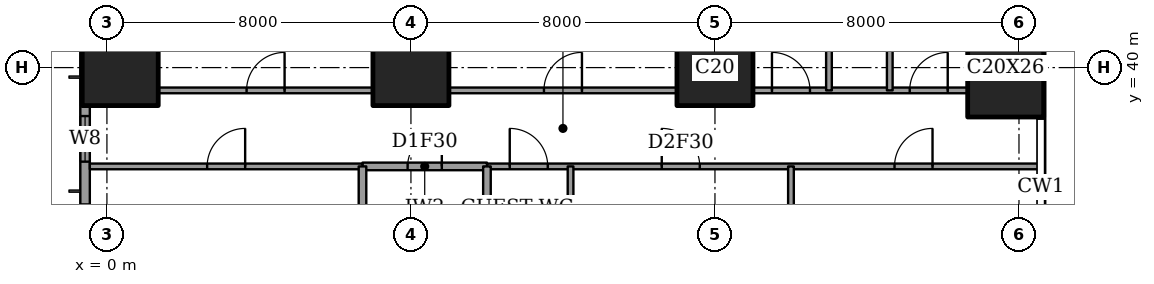
"""IFC4 building model, lengths in metres.
Left out: names, types, materials, properties, quantities, classifications, styles, units other than length and angle.
Written with IfcOpenShell. Run it as: python <this file> out.ifc"""

import sys

from ifc_helpers import new_model, si_unit, direction, frame, frame_2d, origin, origin_2d, place, context, subcontext, project, spatial, rectangle, extrude, element, fill, save


model = new_model("IFC4")
c1 = context("Model", 3, precision=1e-05, world=origin(), true_north=direction((0.0, 1.0)))
c2 = subcontext(c1, "Body", "Model", "MODEL_VIEW")
j1 = project(units=[si_unit("LENGTHUNIT", "METRE"), si_unit("PLANEANGLEUNIT", "RADIAN")], contexts=[c1])
p1 = place(None, origin())
s1 = spatial("IfcSite", under=j1, at=p1, CompositionType="ELEMENT")
p2 = place(p1, origin())
s2 = spatial("IfcBuilding", under=s1, at=p2, CompositionType="ELEMENT")
p3 = place(p2, frame((0.0, 0.0, 87.2)))
s3 = spatial("IfcBuildingStorey", under=s2, at=p3, CompositionType="ELEMENT", Elevation=87.2)
for number, where, z_axis, x_axis in (
    (1, (0.35, 40.0, 0.0), (0.0, 0.0, 1.0), (1.0, 0.0, 0.0)),
    (2, (8.0, 40.0, 0.0), (0.0, 0.0, 1.0), (1.0, 0.0, 0.0)),
    (3, (16.0, 40.0, 0.0), (0.0, 0.0, 1.0), (1.0, 0.0, 0.0)),
):
    element("IfcColumn", number, at=place(p3, frame(where, z_axis=z_axis, x_axis=x_axis)), inside=s3, PredefinedType="COLUMN", context=c2, shape_type="SweptSolid", body=[
        extrude(rectangle(XDim=2.0, YDim=2.0, at=origin_2d()), origin(), (0.0, 0.0, 1.0), 3.6),
    ])
p4 = place(p3, frame((23.65, 40.0, 0.0), z_axis=(0.0, 0.0, 1.0), x_axis=(1.0, 0.0, 0.0)))
e4 = element("IfcColumn", 4, at=p4, inside=s3, PredefinedType="COLUMN", context=c2, shape_type="SweptSolid", body=[
    extrude(rectangle(XDim=2.0, YDim=2.6, at=origin_2d()), origin(), (0.0, 0.0, 1.0), 3.6),
])
p5 = place(p3, frame((-0.575, 44.825, 0.0), z_axis=(0.0, 0.0, 1.0), x_axis=(0.0, -1.0, 0.0)))
e5 = element("IfcWall", 5, at=p5, inside=s3, PredefinedType="SOLIDWALL", context=c2, shape_type="SweptSolid", body=[
    extrude(rectangle(XDim=41.65, YDim=0.25, at=frame_2d((20.825, 0.0))), origin(), (0.0, 0.0, 1.0), 3.6),
])
p6 = place(p5, frame((0.775, 0.0, 0.6)))
e6 = element("IfcOpeningElement", 6, at=p6, cuts=e5, PredefinedType="OPENING", context=c2, shape_type="SweptSolid", body=[
    extrude(rectangle(XDim=2.4, YDim=2.0, at=frame_2d((1.2, 1.0))), frame((0.0, 0.135, 0.0), z_axis=(0.0, -1.0, 0.0), x_axis=(1.0, 0.0, 0.0)), (0.0, 0.0, 1.0), 0.27),
])
p7 = place(p5, frame((6.1, 0.0, 0.6)))
e7 = element("IfcOpeningElement", 7, at=p7, cuts=e5, PredefinedType="OPENING", context=c2, shape_type="SweptSolid", body=[
    extrude(rectangle(XDim=1.2, YDim=2.0, at=frame_2d((0.6, 1.0))), frame((0.0, 0.135, 0.0), z_axis=(0.0, -1.0, 0.0), x_axis=(1.0, 0.0, 0.0)), (0.0, 0.0, 1.0), 0.27),
])
p8 = place(p5, frame((8.425, 0.0, 0.6)))
e8 = element("IfcOpeningElement", 8, at=p8, cuts=e5, PredefinedType="OPENING", context=c2, shape_type="SweptSolid", body=[
    extrude(rectangle(XDim=2.4, YDim=2.0, at=frame_2d((1.2, 1.0))), frame((0.0, 0.135, 0.0), z_axis=(0.0, -1.0, 0.0), x_axis=(1.0, 0.0, 0.0)), (0.0, 0.0, 1.0), 0.27),
])
p9 = place(p5, frame((15.625, 0.0, 0.6)))
e9 = element("IfcOpeningElement", 9, at=p9, cuts=e5, PredefinedType="OPENING", context=c2, shape_type="SweptSolid", body=[
    extrude(rectangle(XDim=2.4, YDim=2.0, at=frame_2d((1.2, 1.0))), frame((0.0, 0.135, 0.0), z_axis=(0.0, -1.0, 0.0), x_axis=(1.0, 0.0, 0.0)), (0.0, 0.0, 1.0), 0.27),
])
p10 = place(p5, frame((23.625, 0.0, 0.6)))
e10 = element("IfcOpeningElement", 10, at=p10, cuts=e5, PredefinedType="OPENING", context=c2, shape_type="SweptSolid", body=[
    extrude(rectangle(XDim=2.4, YDim=2.0, at=frame_2d((1.2, 1.0))), frame((0.0, 0.135, 0.0), z_axis=(0.0, -1.0, 0.0), x_axis=(1.0, 0.0, 0.0)), (0.0, 0.0, 1.0), 0.27),
])
p11 = place(p5, frame((30.825, 0.0, 0.6)))
e11 = element("IfcOpeningElement", 11, at=p11, cuts=e5, PredefinedType="OPENING", context=c2, shape_type="SweptSolid", body=[
    extrude(rectangle(XDim=2.4, YDim=2.0, at=frame_2d((1.2, 1.0))), frame((0.0, 0.135, 0.0), z_axis=(0.0, -1.0, 0.0), x_axis=(1.0, 0.0, 0.0)), (0.0, 0.0, 1.0), 0.27),
])
p12 = place(p5, frame((34.5, 0.0, 0.6)))
e12 = element("IfcOpeningElement", 12, at=p12, cuts=e5, PredefinedType="OPENING", context=c2, shape_type="SweptSolid", body=[
    extrude(rectangle(XDim=1.2, YDim=2.0, at=frame_2d((0.6, 1.0))), frame((0.0, 0.135, 0.0), z_axis=(0.0, -1.0, 0.0), x_axis=(1.0, 0.0, 0.0)), (0.0, 0.0, 1.0), 0.27),
])
p13 = place(p5, frame((38.475, 0.0, 0.6)))
e13 = element("IfcOpeningElement", 13, at=p13, cuts=e5, PredefinedType="OPENING", context=c2, shape_type="SweptSolid", body=[
    extrude(rectangle(XDim=2.4, YDim=2.0, at=frame_2d((1.2, 1.0))), frame((0.0, 0.135, 0.0), z_axis=(0.0, -1.0, 0.0), x_axis=(1.0, 0.0, 0.0)), (0.0, 0.0, 1.0), 0.27),
])
p14 = place(p3, frame((6.725, 37.4, 0.0), z_axis=(0.0, 0.0, 1.0), x_axis=(1.0, 0.0, 0.0)))
e14 = element("IfcWall", 14, at=p14, inside=s3, PredefinedType="PARTITIONING", context=c2, shape_type="SweptSolid", body=[
    extrude(rectangle(XDim=3.275, YDim=0.2, at=frame_2d((1.637, 0.0))), origin(), (0.0, 0.0, 1.0), 3.25),
])
p15 = place(p14, frame((1.188, 0.0, 0.0)))
e15 = element("IfcOpeningElement", 15, at=p15, cuts=e14, PredefinedType="OPENING", context=c2, shape_type="SweptSolid", body=[
    extrude(rectangle(XDim=0.9, YDim=2.1, at=frame_2d((0.45, 1.05))), frame((0.0, 0.11, 0.0), z_axis=(0.0, -1.0, 0.0), x_axis=(1.0, 0.0, 0.0)), (0.0, 0.0, 1.0), 0.22),
])
p16 = place(p3, frame((-0.45, 37.4, 0.0), z_axis=(0.0, 0.0, 1.0), x_axis=(1.0, 0.0, 0.0)))
e16 = element("IfcWall", 16, at=p16, inside=s3, PredefinedType="PARTITIONING", context=c2, shape_type="SweptSolid", body=[
    extrude(rectangle(XDim=7.175, YDim=0.15, at=frame_2d((3.587, 0.0))), origin(), (0.0, 0.0, 1.0), 3.25),
])
p17 = place(p16, frame((3.087, 0.0, 0.0)))
e17 = element("IfcOpeningElement", 17, at=p17, cuts=e16, PredefinedType="OPENING", context=c2, shape_type="SweptSolid", body=[
    extrude(rectangle(XDim=1.0, YDim=2.1, at=frame_2d((0.5, 1.05))), frame((0.0, 0.085, 0.0), z_axis=(0.0, -1.0, 0.0), x_axis=(1.0, 0.0, 0.0)), (0.0, 0.0, 1.0), 0.17),
])
p18 = place(p3, frame((10.0, 37.4, 0.0), z_axis=(0.0, 0.0, 1.0), x_axis=(1.0, 0.0, 0.0)))
e18 = element("IfcWall", 18, at=p18, inside=s3, PredefinedType="PARTITIONING", context=c2, shape_type="SweptSolid", body=[
    extrude(rectangle(XDim=14.561, YDim=0.15, at=frame_2d((7.281, 0.0))), origin(), (0.0, 0.0, 1.0), 3.25),
])
p19 = place(p18, frame((0.6, 0.0, 0.0)))
e19 = element("IfcOpeningElement", 19, at=p19, cuts=e18, PredefinedType="OPENING", context=c2, shape_type="SweptSolid", body=[
    extrude(rectangle(XDim=1.0, YDim=2.1, at=frame_2d((0.5, 1.05))), frame((0.0, 0.085, 0.0), z_axis=(0.0, -1.0, 0.0), x_axis=(1.0, 0.0, 0.0)), (0.0, 0.0, 1.0), 0.17),
])
p20 = place(p18, frame((4.6, 0.0, 0.0)))
e20 = element("IfcOpeningElement", 20, at=p20, cuts=e18, PredefinedType="OPENING", context=c2, shape_type="SweptSolid", body=[
    extrude(rectangle(XDim=1.0, YDim=2.1, at=frame_2d((0.5, 1.05))), frame((0.0, 0.085, 0.0), z_axis=(0.0, -1.0, 0.0), x_axis=(1.0, 0.0, 0.0)), (0.0, 0.0, 1.0), 0.17),
])
p21 = place(p18, frame((10.725, 0.0, 0.0)))
e21 = element("IfcOpeningElement", 21, at=p21, cuts=e18, PredefinedType="OPENING", context=c2, shape_type="SweptSolid", body=[
    extrude(rectangle(XDim=1.0, YDim=2.1, at=frame_2d((0.5, 1.05))), frame((0.0, 0.085, 0.0), z_axis=(0.0, -1.0, 0.0), x_axis=(1.0, 0.0, 0.0)), (0.0, 0.0, 1.0), 0.17),
])
p22 = place(p3, frame((1.35, 39.4, 0.0), z_axis=(0.0, 0.0, 1.0), x_axis=(1.0, 0.0, 0.0)))
e22 = element("IfcWall", 22, at=p22, inside=s3, PredefinedType="PARTITIONING", context=c2, shape_type="SweptSolid", body=[
    extrude(rectangle(XDim=5.65, YDim=0.15, at=frame_2d((2.825, 0.0))), origin(), (0.0, 0.0, 1.0), 3.25),
])
p23 = place(p22, frame((2.325, 0.0, 0.0)))
e23 = element("IfcOpeningElement", 23, at=p23, cuts=e22, PredefinedType="OPENING", context=c2, shape_type="SweptSolid", body=[
    extrude(rectangle(XDim=1.0, YDim=2.1, at=frame_2d((0.5, 1.05))), frame((0.0, 0.085, 0.0), z_axis=(0.0, -1.0, 0.0), x_axis=(1.0, 0.0, 0.0)), (0.0, 0.0, 1.0), 0.17),
])
p24 = place(p3, frame((9.0, 39.4, 0.0), z_axis=(0.0, 0.0, 1.0), x_axis=(1.0, 0.0, 0.0)))
e24 = element("IfcWall", 24, at=p24, inside=s3, PredefinedType="PARTITIONING", context=c2, shape_type="SweptSolid", body=[
    extrude(rectangle(XDim=6.0, YDim=0.15, at=frame_2d((3.0, 0.0))), origin(), (0.0, 0.0, 1.0), 3.25),
])
p25 = place(p24, frame((2.5, 0.0, 0.0)))
e25 = element("IfcOpeningElement", 25, at=p25, cuts=e24, PredefinedType="OPENING", context=c2, shape_type="SweptSolid", body=[
    extrude(rectangle(XDim=1.0, YDim=2.1, at=frame_2d((0.5, 1.05))), frame((0.0, 0.085, 0.0), z_axis=(0.0, -1.0, 0.0), x_axis=(1.0, 0.0, 0.0)), (0.0, 0.0, 1.0), 0.17),
])
p26 = place(p3, frame((17.0, 39.4, 0.0), z_axis=(0.0, 0.0, 1.0), x_axis=(1.0, 0.0, 0.0)))
e26 = element("IfcWall", 26, at=p26, inside=s3, PredefinedType="PARTITIONING", context=c2, shape_type="SweptSolid", body=[
    extrude(rectangle(XDim=5.65, YDim=0.15, at=frame_2d((2.825, 0.0))), origin(), (0.0, 0.0, 1.0), 3.25),
])
p27 = place(p26, frame((0.5, 0.0, 0.0)))
e27 = element("IfcOpeningElement", 27, at=p27, cuts=e26, PredefinedType="OPENING", context=c2, shape_type="SweptSolid", body=[
    extrude(rectangle(XDim=1.0, YDim=2.1, at=frame_2d((0.5, 1.05))), frame((0.0, 0.085, 0.0), z_axis=(0.0, -1.0, 0.0), x_axis=(1.0, 0.0, 0.0)), (0.0, 0.0, 1.0), 0.17),
])
p28 = place(p26, frame((4.125, 0.0, 0.0)))
e28 = element("IfcOpeningElement", 28, at=p28, cuts=e26, PredefinedType="OPENING", context=c2, shape_type="SweptSolid", body=[
    extrude(rectangle(XDim=1.0, YDim=2.1, at=frame_2d((0.5, 1.05))), frame((0.0, 0.085, 0.0), z_axis=(0.0, -1.0, 0.0), x_axis=(1.0, 0.0, 0.0)), (0.0, 0.0, 1.0), 0.17),
])
p29 = place(p3, frame((6.725, 33.2, 0.0), z_axis=(0.0, 0.0, 1.0), x_axis=(0.0, 1.0, 0.0)))
e29 = element("IfcWall", 29, at=p29, inside=s3, PredefinedType="PARTITIONING", context=c2, shape_type="SweptSolid", body=[
    extrude(rectangle(XDim=4.2, YDim=0.2, at=frame_2d((2.1, 0.0))), origin(), (0.0, 0.0, 1.0), 3.25),
])
p30 = place(p3, frame((10.0, 31.0, 0.0), z_axis=(0.0, 0.0, 1.0), x_axis=(0.0, 1.0, 0.0)))
e30 = element("IfcWall", 30, at=p30, inside=s3, PredefinedType="PARTITIONING", context=c2, shape_type="SweptSolid", body=[
    extrude(rectangle(XDim=6.4, YDim=0.2, at=frame_2d((3.2, 0.0))), origin(), (0.0, 0.0, 1.0), 3.25),
])
p31 = place(p3, frame((12.2, 30.675, 0.0), z_axis=(0.0, 0.0, 1.0), x_axis=(0.0, 1.0, 0.0)))
e31 = element("IfcWall", 31, at=p31, inside=s3, PredefinedType="PARTITIONING", context=c2, shape_type="SweptSolid", body=[
    extrude(rectangle(XDim=6.725, YDim=0.15, at=frame_2d((3.362, 0.0))), origin(), (0.0, 0.0, 1.0), 3.25),
])
p32 = place(p3, frame((18.0, 28.0, 0.0), z_axis=(0.0, 0.0, 1.0), x_axis=(0.0, 1.0, 0.0)))
e32 = element("IfcWall", 32, at=p32, inside=s3, PredefinedType="PARTITIONING", context=c2, shape_type="SweptSolid", body=[
    extrude(rectangle(XDim=9.4, YDim=0.15, at=frame_2d((4.7, 0.0))), origin(), (0.0, 0.0, 1.0), 3.25),
])
p33 = place(p32, frame((0.887, 0.0, 0.0)))
e33 = element("IfcOpeningElement", 33, at=p33, cuts=e32, PredefinedType="OPENING", context=c2, shape_type="SweptSolid", body=[
    extrude(rectangle(XDim=0.9, YDim=2.1, at=frame_2d((0.45, 1.05))), frame((0.0, 0.085, 0.0), z_axis=(0.0, -1.0, 0.0), x_axis=(1.0, 0.0, 0.0)), (0.0, 0.0, 1.0), 0.17),
])
p34 = place(p3, frame((19.0, 39.4, 0.0), z_axis=(0.0, 0.0, 1.0), x_axis=(0.0, 1.0, 0.0)))
e34 = element("IfcWall", 34, at=p34, inside=s3, PredefinedType="PARTITIONING", context=c2, shape_type="SweptSolid", body=[
    extrude(rectangle(XDim=9.05, YDim=0.15, at=frame_2d((4.525, 0.0))), origin(), (0.0, 0.0, 1.0), 3.25),
])
p35 = place(p3, frame((20.6, 39.4, 0.0), z_axis=(0.0, 0.0, 1.0), x_axis=(0.0, 1.0, 0.0)))
e35 = element("IfcWall", 35, at=p35, inside=s3, PredefinedType="PARTITIONING", context=c2, shape_type="SweptSolid", body=[
    extrude(rectangle(XDim=9.05, YDim=0.15, at=frame_2d((4.525, 0.0))), origin(), (0.0, 0.0, 1.0), 3.25),
])
p36 = place(p35, frame((4.075, 0.0, 0.0)))
e36 = element("IfcOpeningElement", 36, at=p36, cuts=e35, PredefinedType="OPENING", context=c2, shape_type="SweptSolid", body=[
    extrude(rectangle(XDim=0.9, YDim=2.1, at=frame_2d((0.45, 1.05))), frame((0.0, 0.085, 0.0), z_axis=(0.0, -1.0, 0.0), x_axis=(1.0, 0.0, 0.0)), (0.0, 0.0, 1.0), 0.17),
])
p37 = place(p7, origin())
e37 = element("IfcWindow", 37, at=p37, inside=s3, PartitioningType="SINGLE_PANEL", PredefinedType="WINDOW", context=c2, shape_type="SweptSolid", body=[
    extrude(rectangle(XDim=1.2, YDim=2.0, at=frame_2d((0.6, 1.0))), frame((0.0, 0.03, 0.0), z_axis=(0.0, -1.0, 0.0), x_axis=(1.0, 0.0, 0.0)), (0.0, 0.0, 1.0), 0.06),
])
fill(e7, e37)
p38 = place(p23, origin())
e38 = element("IfcDoor", 38, at=p38, inside=s3, OperationType="SINGLE_SWING_LEFT", PredefinedType="DOOR", context=c2, shape_type="SweptSolid", body=[
    extrude(rectangle(XDim=1.0, YDim=2.1, at=frame_2d((0.5, 1.05))), frame((0.0, 0.025, 0.0), z_axis=(0.0, -1.0, 0.0), x_axis=(1.0, 0.0, 0.0)), (0.0, 0.0, 1.0), 0.05),
])
fill(e23, e38)
p39 = place(p25, origin())
e39 = element("IfcDoor", 39, at=p39, inside=s3, OperationType="SINGLE_SWING_LEFT", PredefinedType="DOOR", context=c2, shape_type="SweptSolid", body=[
    extrude(rectangle(XDim=1.0, YDim=2.1, at=frame_2d((0.5, 1.05))), frame((0.0, 0.025, 0.0), z_axis=(0.0, -1.0, 0.0), x_axis=(1.0, 0.0, 0.0)), (0.0, 0.0, 1.0), 0.05),
])
fill(e25, e39)
p40 = place(p27, origin())
e40 = element("IfcDoor", 40, at=p40, inside=s3, OperationType="SINGLE_SWING_RIGHT", PredefinedType="DOOR", context=c2, shape_type="SweptSolid", body=[
    extrude(rectangle(XDim=1.0, YDim=2.1, at=frame_2d((0.5, 1.05))), frame((0.0, 0.025, 0.0), z_axis=(0.0, -1.0, 0.0), x_axis=(1.0, 0.0, 0.0)), (0.0, 0.0, 1.0), 0.05),
])
fill(e27, e40)
p41 = place(p28, origin())
e41 = element("IfcDoor", 41, at=p41, inside=s3, OperationType="SINGLE_SWING_LEFT", PredefinedType="DOOR", context=c2, shape_type="SweptSolid", body=[
    extrude(rectangle(XDim=1.0, YDim=2.1, at=frame_2d((0.5, 1.05))), frame((0.0, 0.025, 0.0), z_axis=(0.0, -1.0, 0.0), x_axis=(1.0, 0.0, 0.0)), (0.0, 0.0, 1.0), 0.05),
])
fill(e28, e41)
p42 = place(p19, origin())
e42 = element("IfcDoor", 42, at=p42, inside=s3, OperationType="SINGLE_SWING_RIGHT", PredefinedType="DOOR", context=c2, shape_type="SweptSolid", body=[
    extrude(rectangle(XDim=1.0, YDim=2.1, at=frame_2d((0.5, 1.05))), frame((0.0, 0.025, 0.0), z_axis=(0.0, -1.0, 0.0), x_axis=(1.0, 0.0, 0.0)), (0.0, 0.0, 1.0), 0.05),
])
fill(e19, e42)
p43 = place(p17, origin())
e43 = element("IfcDoor", 43, at=p43, inside=s3, OperationType="SINGLE_SWING_LEFT", PredefinedType="DOOR", context=c2, shape_type="SweptSolid", body=[
    extrude(rectangle(XDim=1.0, YDim=2.1, at=frame_2d((0.5, 1.05))), frame((0.0, 0.025, 0.0), z_axis=(0.0, -1.0, 0.0), x_axis=(1.0, 0.0, 0.0)), (0.0, 0.0, 1.0), 0.05),
])
fill(e17, e43)
p44 = place(p15, origin())
e44 = element("IfcDoor", 44, at=p44, inside=s3, OperationType="SINGLE_SWING_LEFT", PredefinedType="DOOR", context=c2, shape_type="SweptSolid", body=[
    extrude(rectangle(XDim=0.9, YDim=2.1, at=frame_2d((0.45, 1.05))), frame((0.0, 0.025, 0.0), z_axis=(0.0, -1.0, 0.0), x_axis=(1.0, 0.0, 0.0)), (0.0, 0.0, 1.0), 0.05),
])
fill(e15, e44)
p45 = place(p20, origin())
e45 = element("IfcDoor", 45, at=p45, inside=s3, OperationType="SINGLE_SWING_RIGHT", PredefinedType="DOOR", context=c2, shape_type="SweptSolid", body=[
    extrude(rectangle(XDim=1.0, YDim=2.1, at=frame_2d((0.5, 1.05))), frame((0.0, 0.025, 0.0), z_axis=(0.0, -1.0, 0.0), x_axis=(1.0, 0.0, 0.0)), (0.0, 0.0, 1.0), 0.05),
])
fill(e20, e45)
p46 = place(p21, origin())
e46 = element("IfcDoor", 46, at=p46, inside=s3, OperationType="SINGLE_SWING_LEFT", PredefinedType="DOOR", context=c2, shape_type="SweptSolid", body=[
    extrude(rectangle(XDim=1.0, YDim=2.1, at=frame_2d((0.5, 1.05))), frame((0.0, 0.025, 0.0), z_axis=(0.0, -1.0, 0.0), x_axis=(1.0, 0.0, 0.0)), (0.0, 0.0, 1.0), 0.05),
])
fill(e21, e46)
save(model, sys.argv[1])
